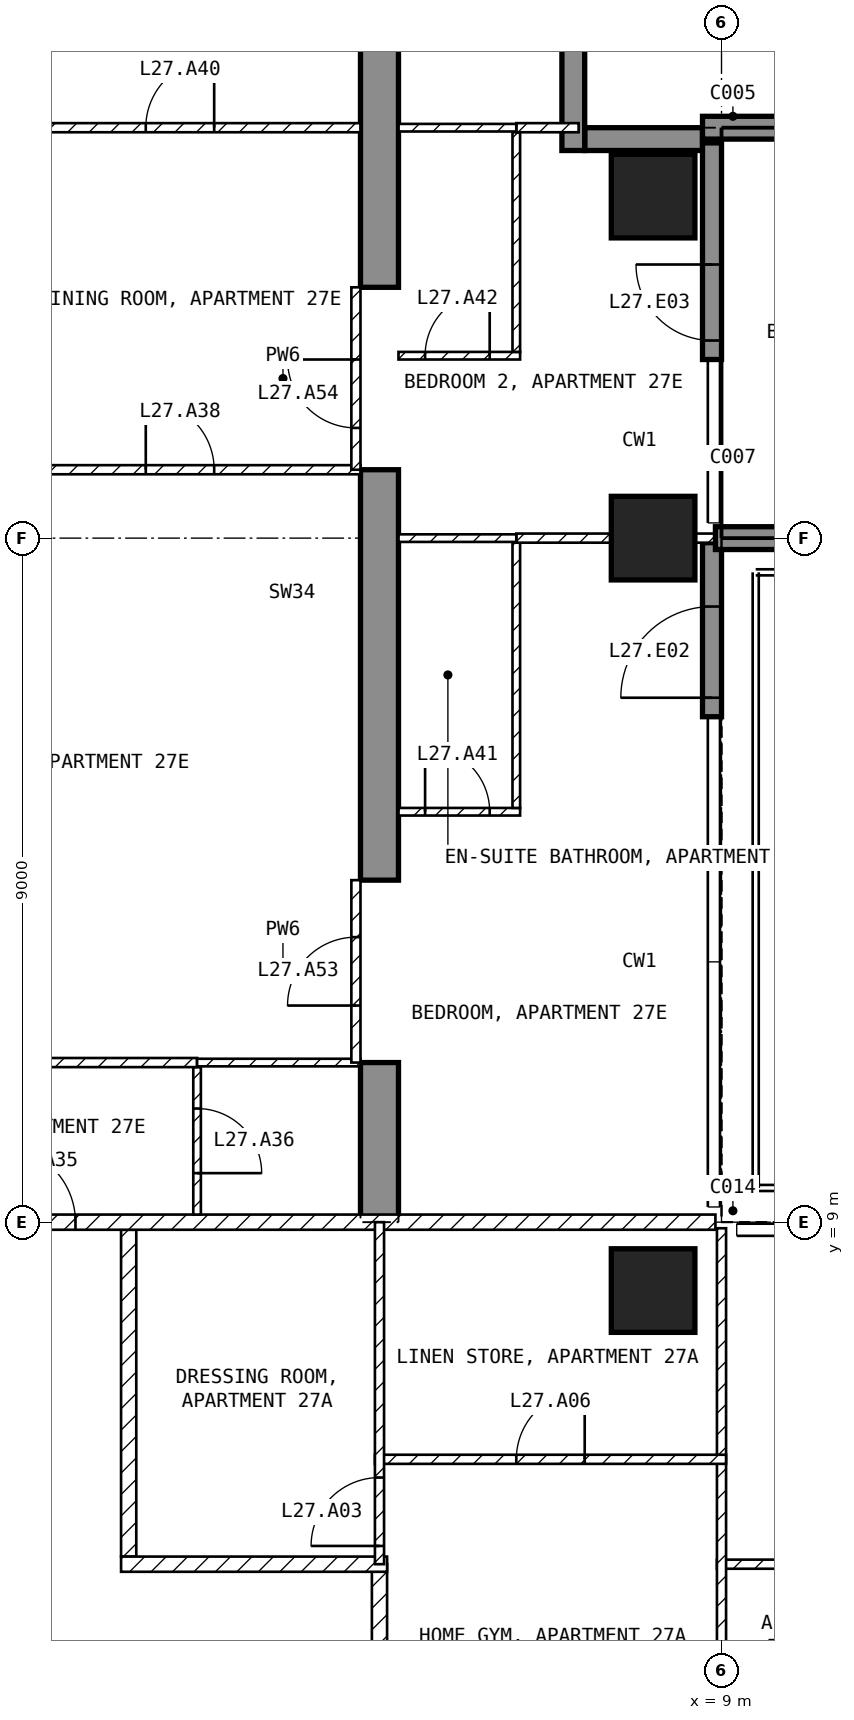
"""IFC4 building model, lengths in metres.
Left out: names, types, materials, properties, quantities, classifications, styles, units other than length and angle.
Written with IfcOpenShell. Run it as: python <this file> out.ifc"""

import sys

from ifc_helpers import new_model, si_unit, direction, frame, frame_2d, origin, origin_2d, place, context, subcontext, project, spatial, polyline, rectangle, outline, extrude, element, fill, save


model = new_model("IFC4")
c1 = context("Model", 3, precision=1e-05, world=origin(), true_north=direction((0.0, 1.0)))
c2 = subcontext(c1, "Body", "Model", "MODEL_VIEW")
j1 = project(units=[si_unit("LENGTHUNIT", "METRE"), si_unit("PLANEANGLEUNIT", "RADIAN")], contexts=[c1])
p1 = place(None, origin())
s1 = spatial("IfcSite", under=j1, at=p1, CompositionType="ELEMENT")
p2 = place(p1, origin())
s2 = spatial("IfcBuilding", under=s1, at=p2, CompositionType="ELEMENT")
p3 = place(p2, frame((0.0, 0.0, 116.4)))
s3 = spatial("IfcBuildingStorey", under=s2, at=p3, CompositionType="ELEMENT", Elevation=116.4)
for number, where, z_axis, x_axis in (
    (1, (8.1, 8.1, -0.25), (0.0, 0.0, 1.0), (1.0, 0.0, 0.0)),
    (2, (8.1, 18.0, -0.25), (0.0, 0.0, 1.0), (1.0, 0.0, 0.0)),
    (3, (8.1, 22.5, -0.25), (0.0, 0.0, 1.0), (1.0, 0.0, 0.0)),
):
    element("IfcColumn", number, at=place(p3, frame(where, z_axis=z_axis, x_axis=x_axis)), inside=s3, PredefinedType="COLUMN", context=c2, shape_type="SweptSolid", body=[
        extrude(rectangle(XDim=1.1, YDim=1.1, at=origin_2d()), origin(), (0.0, 0.0, 1.0), 3.5),
    ])
p4 = place(p3, frame((4.25, 9.0, -0.25), z_axis=(1.0, 0.0, 0.0), x_axis=(0.0, 1.0, 0.0)))
e4 = element("IfcWall", 4, at=p4, inside=s3, PredefinedType="SHEAR", context=c2, shape_type="SweptSolid", body=[
    extrude(outline(polyline([(0.0, 0.0), (2.1, 0.0), (2.1, 2.65), (4.5, 2.65), (4.5, 0.0), (9.9, 0.0), (9.9, 2.65), (12.3, 2.65), (12.3, 0.0), (16.55, 0.0), (16.55, 3.5), (0.0, 3.5), (0.0, 0.0)])), origin(), (0.0, 0.0, 1.0), 0.5),
])
p5 = place(p3, frame((8.875, 15.65, 0.0), z_axis=(0.0, 0.0, 1.0), x_axis=(0.0, 1.0, 0.0)))
e5 = element("IfcWall", 5, at=p5, inside=s3, PredefinedType="SOLIDWALL", context=c2, shape_type="SweptSolid", body=[
    extrude(rectangle(XDim=2.29, YDim=0.25, at=frame_2d((1.145, 0.0))), origin(), (0.0, 0.0, 1.0), 3.25),
])
p6 = place(p5, frame((0.25, 0.0, 0.0)))
e6 = element("IfcOpeningElement", 6, at=p6, cuts=e5, PredefinedType="OPENING", context=c2, shape_type="SweptSolid", body=[
    extrude(rectangle(XDim=1.2, YDim=2.4, at=frame_2d((0.6, 1.2))), frame((0.0, 0.135, 0.0), z_axis=(0.0, -1.0, 0.0), x_axis=(1.0, 0.0, 0.0)), (0.0, 0.0, 1.0), 0.27),
])
p7 = place(p3, frame((8.875, 20.35, 0.0), z_axis=(0.0, 0.0, 1.0), x_axis=(0.0, 1.0, 0.0)))
e7 = element("IfcWall", 7, at=p7, inside=s3, PredefinedType="SOLIDWALL", context=c2, shape_type="SweptSolid", body=[
    extrude(rectangle(XDim=2.85, YDim=0.25, at=frame_2d((1.425, 0.0))), origin(), (0.0, 0.0, 1.0), 3.25),
])
p8 = place(p7, frame((0.25, 0.0, 0.0)))
e8 = element("IfcOpeningElement", 8, at=p8, cuts=e7, PredefinedType="OPENING", context=c2, shape_type="SweptSolid", body=[
    extrude(rectangle(XDim=1.0, YDim=2.4, at=frame_2d((0.5, 1.2))), frame((0.0, 0.135, 0.0), z_axis=(0.0, -1.0, 0.0), x_axis=(1.0, 0.0, 0.0)), (0.0, 0.0, 1.0), 0.27),
])
p9 = place(p3, frame((8.75, 23.25, 0.0), z_axis=(0.0, 0.0, 1.0), x_axis=(-1.0, 0.0, 0.0)))
e9 = element("IfcWall", 9, at=p9, inside=s3, PredefinedType="SOLIDWALL", context=c2, shape_type="SweptSolid", body=[
    extrude(rectangle(XDim=1.55, YDim=0.3, at=frame_2d((0.775, 0.0))), origin(), (0.0, 0.0, 1.0), 3.25),
])
p10 = place(p3, frame((7.05, 23.1, 0.0), z_axis=(0.0, 0.0, 1.0), x_axis=(0.0, 1.0, 0.0)))
e10 = element("IfcWall", 10, at=p10, inside=s3, PredefinedType="SOLIDWALL", context=c2, shape_type="SweptSolid", body=[
    extrude(rectangle(XDim=1.8, YDim=0.3, at=frame_2d((0.9, 0.0))), origin(), (0.0, 0.0, 1.0), 3.25),
])
p11 = place(p3, frame((8.92, 18.0, 0.0), z_axis=(0.0, 0.0, 1.0), x_axis=(1.0, 0.0, 0.0)))
e11 = element("IfcWall", 11, at=p11, inside=s3, PredefinedType="SOLIDWALL", context=c2, shape_type="SweptSolid", body=[
    extrude(rectangle(XDim=2.82, YDim=0.3, at=frame_2d((1.41, 0.0))), origin(), (0.0, 0.0, 1.0), 3.25),
])
p12 = place(p3, frame((8.75, 23.4, 0.0), z_axis=(0.0, 0.0, 1.0), x_axis=(1.0, 0.0, 0.0)))
e12 = element("IfcWall", 12, at=p12, inside=s3, PredefinedType="SOLIDWALL", context=c2, shape_type="SweptSolid", body=[
    extrude(rectangle(XDim=2.95, YDim=0.3, at=frame_2d((1.475, 0.0))), origin(), (0.0, 0.0, 1.0), 3.25),
])
p13 = place(p3, frame((4.5, 4.5, 0.0), z_axis=(0.0, 0.0, 1.0), x_axis=(0.0, -1.0, 0.0)))
e13 = element("IfcWall", 13, at=p13, inside=s3, PredefinedType="PARTITIONING", context=c2, shape_type="SweptSolid", body=[
    extrude(rectangle(XDim=3.2, YDim=0.2, at=frame_2d((1.6, 0.0))), origin(), (0.0, 0.0, 1.0), 3.25),
])
p14 = place(p3, frame((1.2, 8.9, 0.0), z_axis=(0.0, 0.0, 1.0), x_axis=(0.0, -1.0, 0.0)))
e14 = element("IfcWall", 14, at=p14, inside=s3, PredefinedType="PARTITIONING", context=c2, shape_type="SweptSolid", body=[
    extrude(rectangle(XDim=4.3, YDim=0.2, at=frame_2d((2.15, 0.0))), origin(), (0.0, 0.0, 1.0), 3.25),
])
p15 = place(p3, frame((1.1, 4.5, 0.0), z_axis=(0.0, 0.0, 1.0), x_axis=(1.0, 0.0, 0.0)))
e15 = element("IfcWall", 15, at=p15, inside=s3, PredefinedType="PARTITIONING", context=c2, shape_type="SweptSolid", body=[
    extrude(rectangle(XDim=3.5, YDim=0.2, at=frame_2d((1.75, 0.0))), origin(), (0.0, 0.0, 1.0), 3.25),
])
p16 = place(p3, frame((-8.92, 9.0, 0.0), z_axis=(0.0, 0.0, 1.0), x_axis=(1.0, 0.0, 0.0)))
e16 = element("IfcWall", 16, at=p16, inside=s3, PredefinedType="PARTITIONING", context=c2, shape_type="SweptSolid", body=[
    extrude(rectangle(XDim=17.84, YDim=0.2, at=frame_2d((8.92, 0.0))), origin(), (0.0, 0.0, 1.0), 3.25),
])
p17 = place(p16, frame((8.42, 0.0, 0.0)))
e17 = element("IfcOpeningElement", 17, at=p17, cuts=e16, PredefinedType="OPENING", context=c2, shape_type="SweptSolid", body=[
    extrude(rectangle(XDim=1.0, YDim=2.1, at=frame_2d((0.5, 1.05))), frame((0.0, 0.11, 0.0), z_axis=(0.0, -1.0, 0.0), x_axis=(1.0, 0.0, 0.0)), (0.0, 0.0, 1.0), 0.22),
])
p18 = place(p3, frame((8.94, 4.5, 0.0), z_axis=(0.0, 0.0, 1.0), x_axis=(1.0, 0.0, 0.0)))
e18 = element("IfcWall", 18, at=p18, inside=s3, PredefinedType="PARTITIONING", context=c2, shape_type="SweptSolid", body=[
    extrude(rectangle(XDim=5.46, YDim=0.12, at=frame_2d((2.73, 0.0))), origin(), (0.0, 0.0, 1.0), 3.25),
])
p19 = place(p18, frame((0.81, 0.0, 0.0)))
e19 = element("IfcOpeningElement", 19, at=p19, cuts=e18, PredefinedType="OPENING", context=c2, shape_type="SweptSolid", body=[
    extrude(rectangle(XDim=0.9, YDim=2.1, at=frame_2d((0.45, 1.05))), frame((0.0, 0.07, 0.0), z_axis=(0.0, -1.0, 0.0), x_axis=(1.0, 0.0, 0.0)), (0.0, 0.0, 1.0), 0.14),
])
p20 = place(p3, frame((9.0, 1.3, 0.0), z_axis=(0.0, 0.0, 1.0), x_axis=(0.0, 1.0, 0.0)))
e20 = element("IfcWall", 20, at=p20, inside=s3, PredefinedType="PARTITIONING", context=c2, shape_type="SweptSolid", body=[
    extrude(rectangle(XDim=7.62, YDim=0.12, at=frame_2d((3.81, 0.0))), origin(), (0.0, 0.0, 1.0), 3.25),
])
p21 = place(p20, frame((1.15, 0.0, 0.0)))
e21 = element("IfcOpeningElement", 21, at=p21, cuts=e20, PredefinedType="OPENING", context=c2, shape_type="SweptSolid", body=[
    extrude(rectangle(XDim=0.9, YDim=2.1, at=frame_2d((0.45, 1.05))), frame((0.0, 0.07, 0.0), z_axis=(0.0, -1.0, 0.0), x_axis=(1.0, 0.0, 0.0)), (0.0, 0.0, 1.0), 0.14),
])
p22 = place(p3, frame((4.44, 5.88, 0.0), z_axis=(0.0, 0.0, 1.0), x_axis=(1.0, 0.0, 0.0)))
e22 = element("IfcWall", 22, at=p22, inside=s3, PredefinedType="PARTITIONING", context=c2, shape_type="SweptSolid", body=[
    extrude(rectangle(XDim=4.62, YDim=0.12, at=frame_2d((2.31, 0.0))), origin(), (0.0, 0.0, 1.0), 3.25),
])
p23 = place(p22, frame((1.86, 0.0, 0.0)))
e23 = element("IfcOpeningElement", 23, at=p23, cuts=e22, PredefinedType="OPENING", context=c2, shape_type="SweptSolid", body=[
    extrude(rectangle(XDim=0.9, YDim=2.1, at=frame_2d((0.45, 1.05))), frame((0.0, 0.07, 0.0), z_axis=(0.0, -1.0, 0.0), x_axis=(1.0, 0.0, 0.0)), (0.0, 0.0, 1.0), 0.14),
])
p24 = place(p3, frame((4.5, 4.5, 0.0), z_axis=(0.0, 0.0, 1.0), x_axis=(0.0, 1.0, 0.0)))
e24 = element("IfcWall", 24, at=p24, inside=s3, PredefinedType="PARTITIONING", context=c2, shape_type="SweptSolid", body=[
    extrude(rectangle(XDim=4.5, YDim=0.12, at=frame_2d((2.25, 0.0))), origin(), (0.0, 0.0, 1.0), 3.25),
])
p25 = place(p24, frame((0.24, 0.0, 0.0)))
e25 = element("IfcOpeningElement", 25, at=p25, cuts=e24, PredefinedType="OPENING", context=c2, shape_type="SweptSolid", body=[
    extrude(rectangle(XDim=0.9, YDim=2.1, at=frame_2d((0.45, 1.05))), frame((0.0, 0.07, 0.0), z_axis=(0.0, -1.0, 0.0), x_axis=(1.0, 0.0, 0.0)), (0.0, 0.0, 1.0), 0.14),
])
p26 = place(p3, frame((2.1, 11.04, 0.0), z_axis=(0.0, 0.0, 1.0), x_axis=(0.0, -1.0, 0.0)))
e26 = element("IfcWall", 26, at=p26, inside=s3, PredefinedType="PARTITIONING", context=c2, shape_type="SweptSolid", body=[
    extrude(rectangle(XDim=1.94, YDim=0.1, at=frame_2d((0.97, 0.0))), origin(), (0.0, 0.0, 1.0), 3.25),
])
p27 = place(p26, frame((0.545, 0.0, 0.0)))
e27 = element("IfcOpeningElement", 27, at=p27, cuts=e26, PredefinedType="OPENING", context=c2, shape_type="SweptSolid", body=[
    extrude(rectangle(XDim=0.85, YDim=2.1, at=frame_2d((0.425, 1.05))), frame((0.0, 0.06, 0.0), z_axis=(0.0, -1.0, 0.0), x_axis=(1.0, 0.0, 0.0)), (0.0, 0.0, 1.0), 0.12),
])
p28 = place(p3, frame((-4.25, 11.1, 0.0), z_axis=(0.0, 0.0, 1.0), x_axis=(1.0, 0.0, 0.0)))
e28 = element("IfcWall", 28, at=p28, inside=s3, PredefinedType="PARTITIONING", context=c2, shape_type="SweptSolid", body=[
    extrude(rectangle(XDim=6.35, YDim=0.12, at=frame_2d((3.175, 0.0))), origin(), (0.0, 0.0, 1.0), 3.25),
])
p29 = place(p28, frame((2.725, 0.0, 0.0)))
e29 = element("IfcOpeningElement", 29, at=p29, cuts=e28, PredefinedType="OPENING", context=c2, shape_type="SweptSolid", body=[
    extrude(rectangle(XDim=0.9, YDim=2.1, at=frame_2d((0.45, 1.05))), frame((0.0, 0.07, 0.0), z_axis=(0.0, -1.0, 0.0), x_axis=(1.0, 0.0, 0.0)), (0.0, 0.0, 1.0), 0.14),
])
p30 = place(p3, frame((2.1, 11.1, 0.0), z_axis=(0.0, 0.0, 1.0), x_axis=(1.0, 0.0, 0.0)))
e30 = element("IfcWall", 30, at=p30, inside=s3, PredefinedType="PARTITIONING", context=c2, shape_type="SweptSolid", body=[
    extrude(rectangle(XDim=2.15, YDim=0.1, at=frame_2d((1.075, 0.0))), origin(), (0.0, 0.0, 1.0), 3.25),
])
p31 = place(p3, frame((-4.25, 18.9, 0.0), z_axis=(0.0, 0.0, 1.0), x_axis=(1.0, 0.0, 0.0)))
e31 = element("IfcWall", 31, at=p31, inside=s3, PredefinedType="PARTITIONING", context=c2, shape_type="SweptSolid", body=[
    extrude(rectangle(XDim=8.5, YDim=0.12, at=frame_2d((4.25, 0.0))), origin(), (0.0, 0.0, 1.0), 3.25),
])
p32 = place(p31, frame((5.675, 0.0, 0.0)))
e32 = element("IfcOpeningElement", 32, at=p32, cuts=e31, PredefinedType="OPENING", context=c2, shape_type="SweptSolid", body=[
    extrude(rectangle(XDim=0.9, YDim=2.1, at=frame_2d((0.45, 1.05))), frame((0.0, 0.07, 0.0), z_axis=(0.0, -1.0, 0.0), x_axis=(1.0, 0.0, 0.0)), (0.0, 0.0, 1.0), 0.14),
])
p33 = place(p3, frame((-4.25, 23.4, 0.0), z_axis=(0.0, 0.0, 1.0), x_axis=(1.0, 0.0, 0.0)))
e33 = element("IfcWall", 33, at=p33, inside=s3, PredefinedType="PARTITIONING", context=c2, shape_type="SweptSolid", body=[
    extrude(rectangle(XDim=8.5, YDim=0.12, at=frame_2d((4.25, 0.0))), origin(), (0.0, 0.0, 1.0), 3.25),
])
p34 = place(p33, frame((5.675, 0.0, 0.0)))
e34 = element("IfcOpeningElement", 34, at=p34, cuts=e33, PredefinedType="OPENING", context=c2, shape_type="SweptSolid", body=[
    extrude(rectangle(XDim=0.9, YDim=2.1, at=frame_2d((0.45, 1.05))), frame((0.0, 0.07, 0.0), z_axis=(0.0, -1.0, 0.0), x_axis=(1.0, 0.0, 0.0)), (0.0, 0.0, 1.0), 0.14),
])
p35 = place(p3, frame((4.75, 14.4, 0.0), z_axis=(0.0, 0.0, 1.0), x_axis=(1.0, 0.0, 0.0)))
e35 = element("IfcWall", 35, at=p35, inside=s3, PredefinedType="PARTITIONING", context=c2, shape_type="SweptSolid", body=[
    extrude(rectangle(XDim=1.6, YDim=0.1, at=frame_2d((0.8, 0.0))), origin(), (0.0, 0.0, 1.0), 3.25),
])
p36 = place(p35, frame((0.35, 0.0, 0.0)))
e36 = element("IfcOpeningElement", 36, at=p36, cuts=e35, PredefinedType="OPENING", context=c2, shape_type="SweptSolid", body=[
    extrude(rectangle(XDim=0.85, YDim=2.1, at=frame_2d((0.425, 1.05))), frame((0.0, 0.06, 0.0), z_axis=(0.0, -1.0, 0.0), x_axis=(1.0, 0.0, 0.0)), (0.0, 0.0, 1.0), 0.12),
])
p37 = place(p3, frame((6.3, 14.45, 0.0), z_axis=(0.0, 0.0, 1.0), x_axis=(0.0, 1.0, 0.0)))
e37 = element("IfcWall", 37, at=p37, inside=s3, PredefinedType="PARTITIONING", context=c2, shape_type="SweptSolid", body=[
    extrude(rectangle(XDim=3.49, YDim=0.1, at=frame_2d((1.745, 0.0))), origin(), (0.0, 0.0, 1.0), 3.25),
])
p38 = place(p3, frame((6.3, 18.0, 0.0), z_axis=(0.0, 0.0, 1.0), x_axis=(1.0, 0.0, 0.0)))
e38 = element("IfcWall", 38, at=p38, inside=s3, PredefinedType="PARTITIONING", context=c2, shape_type="SweptSolid", body=[
    extrude(rectangle(XDim=2.62, YDim=0.12, at=frame_2d((1.31, 0.0))), origin(), (0.0, 0.0, 1.0), 2.414),
])
p39 = place(p3, frame((4.75, 18.0, 0.0), z_axis=(0.0, 0.0, 1.0), x_axis=(1.0, 0.0, 0.0)))
e39 = element("IfcWall", 39, at=p39, inside=s3, PredefinedType="PARTITIONING", context=c2, shape_type="SweptSolid", body=[
    extrude(rectangle(XDim=1.55, YDim=0.1, at=frame_2d((0.775, 0.0))), origin(), (0.0, 0.0, 1.0), 2.414),
])
p40 = place(p3, frame((4.75, 20.4, 0.0), z_axis=(0.0, 0.0, 1.0), x_axis=(1.0, 0.0, 0.0)))
e40 = element("IfcWall", 40, at=p40, inside=s3, PredefinedType="PARTITIONING", context=c2, shape_type="SweptSolid", body=[
    extrude(rectangle(XDim=1.6, YDim=0.1, at=frame_2d((0.8, 0.0))), origin(), (0.0, 0.0, 1.0), 3.25),
])
p41 = place(p40, frame((0.35, 0.0, 0.0)))
e41 = element("IfcOpeningElement", 41, at=p41, cuts=e40, PredefinedType="OPENING", context=c2, shape_type="SweptSolid", body=[
    extrude(rectangle(XDim=0.85, YDim=2.1, at=frame_2d((0.425, 1.05))), frame((0.0, 0.06, 0.0), z_axis=(0.0, -1.0, 0.0), x_axis=(1.0, 0.0, 0.0)), (0.0, 0.0, 1.0), 0.12),
])
p42 = place(p3, frame((6.3, 20.45, 0.0), z_axis=(0.0, 0.0, 1.0), x_axis=(0.0, 1.0, 0.0)))
e42 = element("IfcWall", 42, at=p42, inside=s3, PredefinedType="PARTITIONING", context=c2, shape_type="SweptSolid", body=[
    extrude(rectangle(XDim=2.89, YDim=0.1, at=frame_2d((1.445, 0.0))), origin(), (0.0, 0.0, 1.0), 3.25),
])
p43 = place(p3, frame((6.3, 23.4, 0.0), z_axis=(0.0, 0.0, 1.0), x_axis=(1.0, 0.0, 0.0)))
e43 = element("IfcWall", 43, at=p43, inside=s3, PredefinedType="PARTITIONING", context=c2, shape_type="SweptSolid", body=[
    extrude(rectangle(XDim=0.82, YDim=0.12, at=frame_2d((0.41, 0.0))), origin(), (0.0, 0.0, 1.0), 3.25),
])
p44 = place(p3, frame((4.75, 23.4, 0.0), z_axis=(0.0, 0.0, 1.0), x_axis=(1.0, 0.0, 0.0)))
e44 = element("IfcWall", 44, at=p44, inside=s3, PredefinedType="PARTITIONING", context=c2, shape_type="SweptSolid", body=[
    extrude(rectangle(XDim=1.55, YDim=0.1, at=frame_2d((0.775, 0.0))), origin(), (0.0, 0.0, 1.0), 3.25),
])
p45 = place(p3, frame((4.19, 11.1, 0.0), z_axis=(0.0, 0.0, 1.0), x_axis=(0.0, 1.0, 0.0)))
e45 = element("IfcWall", 45, at=p45, inside=s3, PredefinedType="PARTITIONING", context=c2, shape_type="SweptSolid", body=[
    extrude(rectangle(XDim=2.4, YDim=0.12, at=frame_2d((1.2, 0.0))), origin(), (0.0, 0.0, 1.0), 2.4),
])
p46 = place(p45, frame((0.75, 0.0, 0.0)))
e46 = element("IfcOpeningElement", 46, at=p46, cuts=e45, PredefinedType="OPENING", context=c2, shape_type="SweptSolid", body=[
    extrude(rectangle(XDim=0.9, YDim=2.1, at=frame_2d((0.45, 1.05))), frame((0.0, 0.07, 0.0), z_axis=(0.0, -1.0, 0.0), x_axis=(1.0, 0.0, 0.0)), (0.0, 0.0, 1.0), 0.14),
])
p47 = place(p3, frame((4.19, 18.9, 0.0), z_axis=(0.0, 0.0, 1.0), x_axis=(0.0, 1.0, 0.0)))
e47 = element("IfcWall", 47, at=p47, inside=s3, PredefinedType="PARTITIONING", context=c2, shape_type="SweptSolid", body=[
    extrude(rectangle(XDim=2.4, YDim=0.12, at=frame_2d((1.2, 0.0))), origin(), (0.0, 0.0, 1.0), 2.4),
])
p48 = place(p47, frame((0.55, 0.0, 0.0)))
e48 = element("IfcOpeningElement", 48, at=p48, cuts=e47, PredefinedType="OPENING", context=c2, shape_type="SweptSolid", body=[
    extrude(rectangle(XDim=0.9, YDim=2.1, at=frame_2d((0.45, 1.05))), frame((0.0, 0.07, 0.0), z_axis=(0.0, -1.0, 0.0), x_axis=(1.0, 0.0, 0.0)), (0.0, 0.0, 1.0), 0.14),
])
p49 = place(p6, origin())
e49 = element("IfcDoor", 49, at=p49, inside=s3, OperationType="SINGLE_SWING_LEFT", PredefinedType="DOOR", context=c2, shape_type="SweptSolid", body=[
    extrude(rectangle(XDim=1.2, YDim=2.4, at=frame_2d((0.6, 1.2))), frame((0.0, 0.025, 0.0), z_axis=(0.0, -1.0, 0.0), x_axis=(1.0, 0.0, 0.0)), (0.0, 0.0, 1.0), 0.05),
])
fill(e6, e49)
p50 = place(p8, origin())
e50 = element("IfcDoor", 50, at=p50, inside=s3, OperationType="SINGLE_SWING_RIGHT", PredefinedType="DOOR", context=c2, shape_type="SweptSolid", body=[
    extrude(rectangle(XDim=1.0, YDim=2.4, at=frame_2d((0.5, 1.2))), frame((0.0, 0.025, 0.0), z_axis=(0.0, -1.0, 0.0), x_axis=(1.0, 0.0, 0.0)), (0.0, 0.0, 1.0), 0.05),
])
fill(e8, e50)
p51 = place(p25, origin())
e51 = element("IfcDoor", 51, at=p51, inside=s3, OperationType="SINGLE_SWING_LEFT", PredefinedType="DOOR", context=c2, shape_type="SweptSolid", body=[
    extrude(rectangle(XDim=0.9, YDim=2.1, at=frame_2d((0.45, 1.05))), frame((0.0, 0.025, 0.0), z_axis=(0.0, -1.0, 0.0), x_axis=(1.0, 0.0, 0.0)), (0.0, 0.0, 1.0), 0.05),
])
fill(e25, e51)
p52 = place(p23, origin())
e52 = element("IfcDoor", 52, at=p52, inside=s3, OperationType="SINGLE_SWING_RIGHT", PredefinedType="DOOR", context=c2, shape_type="SweptSolid", body=[
    extrude(rectangle(XDim=0.9, YDim=2.1, at=frame_2d((0.45, 1.05))), frame((0.0, 0.025, 0.0), z_axis=(0.0, -1.0, 0.0), x_axis=(1.0, 0.0, 0.0)), (0.0, 0.0, 1.0), 0.05),
])
fill(e23, e52)
p53 = place(p17, origin())
e53 = element("IfcDoor", 53, at=p53, inside=s3, OperationType="SINGLE_SWING_LEFT", PredefinedType="DOOR", context=c2, shape_type="SweptSolid", body=[
    extrude(rectangle(XDim=1.0, YDim=2.1, at=frame_2d((0.5, 1.05))), frame((0.0, 0.025, 0.0), z_axis=(0.0, -1.0, 0.0), x_axis=(1.0, 0.0, 0.0)), (0.0, 0.0, 1.0), 0.05),
])
fill(e17, e53)
p54 = place(p27, origin())
e54 = element("IfcDoor", 54, at=p54, inside=s3, OperationType="SINGLE_SWING_RIGHT", PredefinedType="DOOR", context=c2, shape_type="SweptSolid", body=[
    extrude(rectangle(XDim=0.85, YDim=2.1, at=frame_2d((0.425, 1.05))), frame((0.0, 0.025, 0.0), z_axis=(0.0, -1.0, 0.0), x_axis=(1.0, 0.0, 0.0)), (0.0, 0.0, 1.0), 0.05),
])
fill(e27, e54)
p55 = place(p32, origin())
e55 = element("IfcDoor", 55, at=p55, inside=s3, OperationType="SINGLE_SWING_LEFT", PredefinedType="DOOR", context=c2, shape_type="SweptSolid", body=[
    extrude(rectangle(XDim=0.9, YDim=2.1, at=frame_2d((0.45, 1.05))), frame((0.0, 0.025, 0.0), z_axis=(0.0, -1.0, 0.0), x_axis=(1.0, 0.0, 0.0)), (0.0, 0.0, 1.0), 0.05),
])
fill(e32, e55)
p56 = place(p34, origin())
e56 = element("IfcDoor", 56, at=p56, inside=s3, OperationType="SINGLE_SWING_RIGHT", PredefinedType="DOOR", context=c2, shape_type="SweptSolid", body=[
    extrude(rectangle(XDim=0.9, YDim=2.1, at=frame_2d((0.45, 1.05))), frame((0.0, 0.025, 0.0), z_axis=(0.0, -1.0, 0.0), x_axis=(1.0, 0.0, 0.0)), (0.0, 0.0, 1.0), 0.05),
])
fill(e34, e56)
p57 = place(p36, origin())
e57 = element("IfcDoor", 57, at=p57, inside=s3, OperationType="SINGLE_SWING_LEFT", PredefinedType="DOOR", context=c2, shape_type="SweptSolid", body=[
    extrude(rectangle(XDim=0.85, YDim=2.1, at=frame_2d((0.425, 1.05))), frame((0.0, 0.025, 0.0), z_axis=(0.0, -1.0, 0.0), x_axis=(1.0, 0.0, 0.0)), (0.0, 0.0, 1.0), 0.05),
])
fill(e36, e57)
p58 = place(p41, origin())
e58 = element("IfcDoor", 58, at=p58, inside=s3, OperationType="SINGLE_SWING_RIGHT", PredefinedType="DOOR", context=c2, shape_type="SweptSolid", body=[
    extrude(rectangle(XDim=0.85, YDim=2.1, at=frame_2d((0.425, 1.05))), frame((0.0, 0.025, 0.0), z_axis=(0.0, -1.0, 0.0), x_axis=(1.0, 0.0, 0.0)), (0.0, 0.0, 1.0), 0.05),
])
fill(e41, e58)
p59 = place(p46, origin())
e59 = element("IfcDoor", 59, at=p59, inside=s3, OperationType="SINGLE_SWING_LEFT", PredefinedType="DOOR", context=c2, shape_type="SweptSolid", body=[
    extrude(rectangle(XDim=0.9, YDim=2.1, at=frame_2d((0.45, 1.05))), frame((0.0, 0.025, 0.0), z_axis=(0.0, -1.0, 0.0), x_axis=(1.0, 0.0, 0.0)), (0.0, 0.0, 1.0), 0.05),
])
fill(e46, e59)
p60 = place(p48, origin())
e60 = element("IfcDoor", 60, at=p60, inside=s3, OperationType="SINGLE_SWING_RIGHT", PredefinedType="DOOR", context=c2, shape_type="SweptSolid", body=[
    extrude(rectangle(XDim=0.9, YDim=2.1, at=frame_2d((0.45, 1.05))), frame((0.0, 0.025, 0.0), z_axis=(0.0, -1.0, 0.0), x_axis=(1.0, 0.0, 0.0)), (0.0, 0.0, 1.0), 0.05),
])
fill(e48, e60)
save(model, sys.argv[1])
